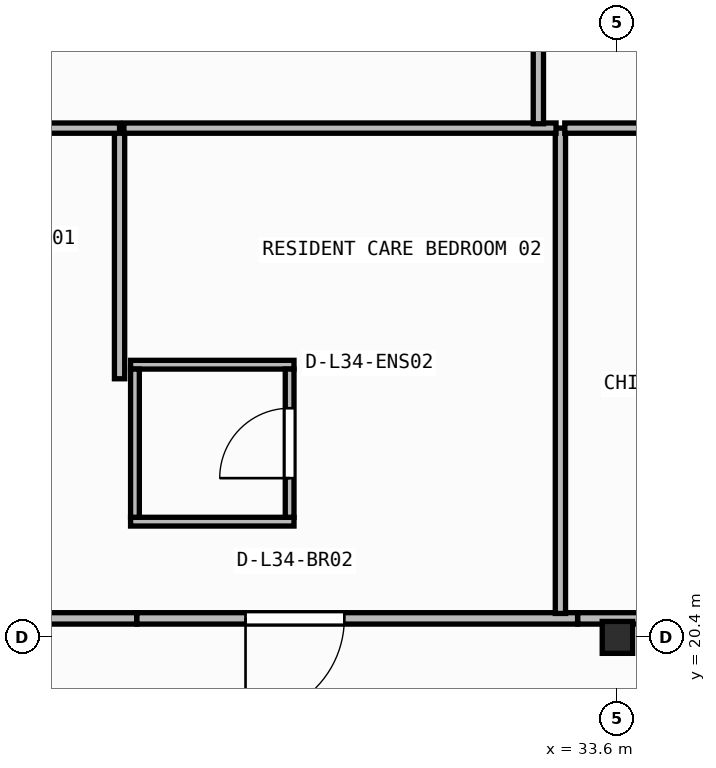
"""IFC4 building model, lengths in metres.
Left out: names, types, materials, properties, quantities, classifications, styles, units other than length and angle.
Written with IfcOpenShell. Run it as: python <this file> out.ifc"""

import sys

from ifc_helpers import new_model, si_unit, direction, frame, frame_2d, origin, origin_2d, place, context, subcontext, project, spatial, rectangle, i_section, extrude, element, fill, save


model = new_model("IFC4")
c1 = context("Model", 3, precision=1e-05, world=origin(), true_north=direction((0.0, 1.0)))
c2 = subcontext(c1, "Body", "Model", "MODEL_VIEW")
j1 = project(units=[si_unit("LENGTHUNIT", "METRE"), si_unit("PLANEANGLEUNIT", "RADIAN")], contexts=[c1])
p1 = place(None, origin())
s1 = spatial("IfcSite", under=j1, at=p1, CompositionType="ELEMENT")
p2 = place(p1, origin())
s2 = spatial("IfcBuilding", under=s1, at=p2, CompositionType="ELEMENT")
p3 = place(p2, frame((0.0, 0.0, 138.9)))
s3 = spatial("IfcBuildingStorey", under=s2, at=p3, CompositionType="ELEMENT", Elevation=138.9)
p4 = place(p3, frame((33.6, 20.4, 0.0), z_axis=(0.0, 0.0, 1.0), x_axis=(1.0, 0.0, 0.0)))
e1 = element("IfcColumn", 1, at=p4, inside=s3, PredefinedType="COLUMN", context=c2, shape_type="SweptSolid", body=[
    extrude(i_section(OverallWidth=0.4, OverallDepth=0.42, WebThickness=0.025, FlangeThickness=0.04, at=origin_2d()), origin(), (0.0, 0.0, 1.0), 3.95),
])
for number, where, z_axis, x_axis in (
    (2, (27.195, 21.923, 0.0), (0.0, 0.0, 1.0), (1.0, 0.0, 0.0)),
    (3, (27.195, 23.988, 0.0), (0.0, 0.0, 1.0), (1.0, 0.0, 0.0)),
):
    element("IfcWall", number, at=place(p3, frame(where, z_axis=z_axis, x_axis=x_axis)), inside=s3, PredefinedType="PARTITIONING", context=c2, shape_type="SweptSolid", body=[
        extrude(rectangle(XDim=2.15, YDim=0.115, at=frame_2d((1.075, 0.0))), origin(), (0.0, 0.0, 1.0), 3.71),
    ])
p5 = place(p3, frame((27.252, 21.98, 0.0), z_axis=(0.0, 0.0, 1.0), x_axis=(0.0, 1.0, 0.0)))
e4 = element("IfcWall", 4, at=p5, inside=s3, PredefinedType="PARTITIONING", context=c2, shape_type="SweptSolid", body=[
    extrude(rectangle(XDim=1.95, YDim=0.115, at=frame_2d((0.975, 0.0))), origin(), (0.0, 0.0, 1.0), 3.71),
])
p6 = place(p3, frame((29.288, 21.98, 0.0), z_axis=(0.0, 0.0, 1.0), x_axis=(0.0, 1.0, 0.0)))
e5 = element("IfcWall", 5, at=p6, inside=s3, PredefinedType="PARTITIONING", context=c2, shape_type="SweptSolid", body=[
    extrude(rectangle(XDim=1.95, YDim=0.115, at=frame_2d((0.975, 0.0))), origin(), (0.0, 0.0, 1.0), 3.71),
])
p7 = place(p6, frame((0.515, 0.0, 0.0)))
e6 = element("IfcOpeningElement", 6, at=p7, cuts=e5, PredefinedType="OPENING", context=c2, shape_type="SweptSolid", body=[
    extrude(rectangle(XDim=0.92, YDim=2.1, at=frame_2d((0.46, 1.05))), frame((0.0, 0.067, 0.0), z_axis=(0.0, -1.0, 0.0), x_axis=(1.0, 0.0, 0.0)), (0.0, 0.0, 1.0), 0.135),
])
p8 = place(p3, frame((27.276, 20.65, 0.0), z_axis=(0.0, 0.0, 1.0), x_axis=(-1.0, 0.0, 0.0)))
e7 = element("IfcWall", 7, at=p8, inside=s3, PredefinedType="PARTITIONING", context=c2, shape_type="SweptSolid", body=[
    extrude(rectangle(XDim=5.556, YDim=0.15, at=frame_2d((2.778, 0.0))), origin(), (0.0, 0.0, 1.0), 3.083),
])
p9 = place(p3, frame((33.076, 20.65, 0.0), z_axis=(0.0, 0.0, 1.0), x_axis=(-1.0, 0.0, 0.0)))
e8 = element("IfcWall", 8, at=p9, inside=s3, PredefinedType="PARTITIONING", context=c2, shape_type="SweptSolid", body=[
    extrude(rectangle(XDim=5.798, YDim=0.15, at=frame_2d((2.899, 0.0))), origin(), (0.0, 0.0, 1.0), 3.083),
])
p10 = place(p9, frame((3.069, 0.0, 0.0)))
e9 = element("IfcOpeningElement", 9, at=p10, cuts=e8, PredefinedType="OPENING", context=c2, shape_type="SweptSolid", body=[
    extrude(rectangle(XDim=1.3, YDim=2.15, at=frame_2d((0.65, 1.075))), frame((0.0, 0.085, 0.0), z_axis=(0.0, -1.0, 0.0), x_axis=(1.0, 0.0, 0.0)), (0.0, 0.0, 1.0), 0.17),
])
p11 = place(p3, frame((39.336, 20.65, 0.0), z_axis=(0.0, 0.0, 1.0), x_axis=(-1.0, 0.0, 0.0)))
e10 = element("IfcWall", 10, at=p11, inside=s3, PredefinedType="PARTITIONING", context=c2, shape_type="SweptSolid", body=[
    extrude(rectangle(XDim=6.258, YDim=0.15, at=frame_2d((3.129, 0.0))), origin(), (0.0, 0.0, 1.0), 3.083),
])
p12 = place(p11, frame((0.319, 0.0, 0.0)))
e11 = element("IfcOpeningElement", 11, at=p12, cuts=e10, PredefinedType="OPENING", context=c2, shape_type="SweptSolid", body=[
    extrude(rectangle(XDim=1.1, YDim=2.1, at=frame_2d((0.55, 1.05))), frame((0.0, 0.085, 0.0), z_axis=(0.0, -1.0, 0.0), x_axis=(1.0, 0.0, 0.0)), (0.0, 0.0, 1.0), 0.17),
])
p13 = place(p3, frame((27.05, 23.802, 0.0), z_axis=(0.0, 0.0, 1.0), x_axis=(0.0, 1.0, 0.0)))
e12 = element("IfcWall", 12, at=p13, inside=s3, PredefinedType="PARTITIONING", context=c2, shape_type="SweptSolid", body=[
    extrude(rectangle(XDim=3.298, YDim=0.135, at=frame_2d((1.649, 0.0))), origin(), (0.0, 0.0, 1.0), 3.71),
])
p14 = place(p3, frame((27.05, 27.1, 0.0), z_axis=(0.0, 0.0, 1.0), x_axis=(-1.0, 0.0, 0.0)))
e13 = element("IfcWall", 13, at=p14, inside=s3, PredefinedType="PARTITIONING", context=c2, shape_type="SweptSolid", body=[
    extrude(rectangle(XDim=5.285, YDim=0.135, at=frame_2d((2.643, 0.0))), origin(), (0.0, 0.0, 1.0), 3.71),
])
p15 = place(p3, frame((32.85, 20.715, 0.0), z_axis=(0.0, 0.0, 1.0), x_axis=(0.0, 1.0, 0.0)))
e14 = element("IfcWall", 14, at=p15, inside=s3, PredefinedType="PARTITIONING", context=c2, shape_type="SweptSolid", body=[
    extrude(rectangle(XDim=6.385, YDim=0.135, at=frame_2d((3.192, 0.0))), origin(), (0.0, 0.0, 1.0), 3.71),
])
p16 = place(p3, frame((32.792, 27.1, 0.0), z_axis=(0.0, 0.0, 1.0), x_axis=(-1.0, 0.0, 0.0)))
e15 = element("IfcWall", 15, at=p16, inside=s3, PredefinedType="PARTITIONING", context=c2, shape_type="SweptSolid", body=[
    extrude(rectangle(XDim=5.685, YDim=0.135, at=frame_2d((2.843, 0.0))), origin(), (0.0, 0.0, 1.0), 3.71),
])
p17 = place(p3, frame((39.11, 27.1, 0.0), z_axis=(0.0, 0.0, 1.0), x_axis=(-1.0, 0.0, 0.0)))
e16 = element("IfcWall", 16, at=p17, inside=s3, PredefinedType="PARTITIONING", context=c2, shape_type="SweptSolid", body=[
    extrude(rectangle(XDim=6.203, YDim=0.135, at=frame_2d((3.101, 0.0))), origin(), (0.0, 0.0, 1.0), 3.71),
])
p18 = place(p17, frame((0.318, 0.0, 0.0)))
e17 = element("IfcOpeningElement", 17, at=p18, cuts=e16, PredefinedType="OPENING", context=c2, shape_type="SweptSolid", body=[
    extrude(rectangle(XDim=1.1, YDim=2.1, at=frame_2d((0.55, 1.05))), frame((0.0, 0.077, 0.0), z_axis=(0.0, -1.0, 0.0), x_axis=(1.0, 0.0, 0.0)), (0.0, 0.0, 1.0), 0.155),
])
p19 = place(p3, frame((32.56, 27.157, 0.0), z_axis=(0.0, 0.0, 1.0), x_axis=(0.0, 1.0, 0.0)))
e18 = element("IfcWall", 18, at=p19, inside=s3, PredefinedType="PARTITIONING", context=c2, shape_type="SweptSolid", body=[
    extrude(rectangle(XDim=4.166, YDim=0.135, at=frame_2d((2.083, 0.0))), origin(), (0.0, 0.0, 1.0), 3.71),
])
p20 = place(p7, origin())
e19 = element("IfcDoor", 19, at=p20, inside=s3, OperationType="SINGLE_SWING_LEFT", PredefinedType="DOOR", context=c2, shape_type="SweptSolid", body=[
    extrude(rectangle(XDim=0.92, YDim=2.1, at=frame_2d((0.46, 1.05))), frame((0.0, 0.025, 0.0), z_axis=(0.0, -1.0, 0.0), x_axis=(1.0, 0.0, 0.0)), (0.0, 0.0, 1.0), 0.05),
])
fill(e6, e19)
p21 = place(p10, origin())
e20 = element("IfcDoor", 20, at=p21, inside=s3, OperationType="SINGLE_SWING_RIGHT", PredefinedType="DOOR", context=c2, shape_type="SweptSolid", body=[
    extrude(rectangle(XDim=1.3, YDim=2.15, at=frame_2d((0.65, 1.075))), frame((0.0, 0.025, 0.0), z_axis=(0.0, -1.0, 0.0), x_axis=(1.0, 0.0, 0.0)), (0.0, 0.0, 1.0), 0.05),
])
fill(e9, e20)
save(model, sys.argv[1])
